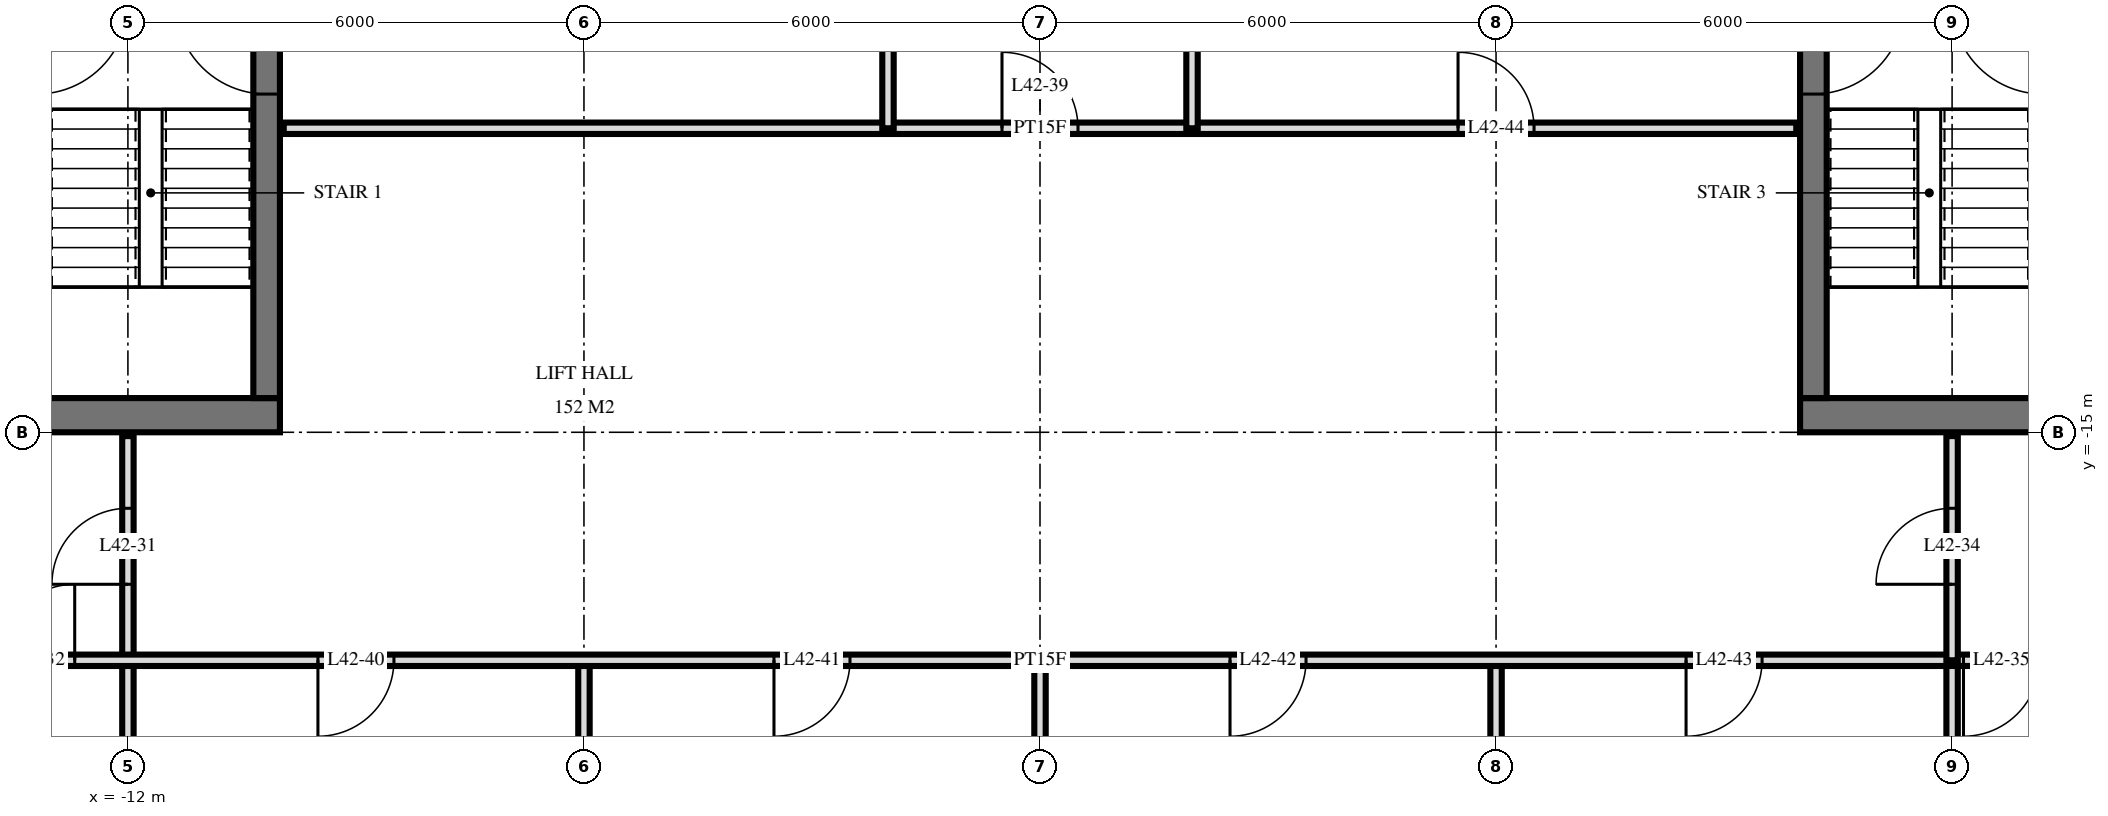
"""IFC4 building model, lengths in metres.
Left out: names, types, materials, properties, quantities, classifications, styles, units other than length and angle.
Written with IfcOpenShell. Run it as: python <this file> out.ifc"""

import sys

from ifc_helpers import new_model, si_unit, direction, frame, frame_2d, origin, place, context, subcontext, project, spatial, rectangle, extrude, element, fill, save


model = new_model("IFC4")
c1 = context("Model", 3, precision=1e-05, world=origin(), true_north=direction((0.0, 1.0)))
c2 = subcontext(c1, "Body", "Model", "MODEL_VIEW")
j1 = project(units=[si_unit("LENGTHUNIT", "METRE"), si_unit("PLANEANGLEUNIT", "RADIAN")], contexts=[c1])
p1 = place(None, origin())
s1 = spatial("IfcSite", under=j1, at=p1, CompositionType="ELEMENT")
p2 = place(p1, origin())
s2 = spatial("IfcBuilding", under=s1, at=p2, CompositionType="ELEMENT")
p3 = place(p2, frame((0.0, 0.0, 163.2)))
s3 = spatial("IfcBuildingStorey", under=s2, at=p3, CompositionType="ELEMENT", Elevation=163.2)
p4 = place(p3, frame((-24.5, -14.775, 0.0), z_axis=(0.0, 0.0, 1.0), x_axis=(1.0, 0.0, 0.0)))
e1 = element("IfcWall", 1, at=p4, inside=s3, PredefinedType="SHEAR", context=c2, shape_type="SweptSolid", body=[
    extrude(rectangle(XDim=14.5, YDim=0.45, at=frame_2d((7.25, 0.0))), origin(), (0.0, 0.0, 1.0), 3.6),
])
p5 = place(p4, frame((6.2, 0.0, 0.0)))
e2 = element("IfcOpeningElement", 2, at=p5, cuts=e1, PredefinedType="OPENING", context=c2, shape_type="SweptSolid", body=[
    extrude(rectangle(XDim=1.2, YDim=2.1, at=frame_2d((0.6, 1.05))), frame((0.0, 0.235, 0.0), z_axis=(0.0, -1.0, 0.0), x_axis=(1.0, 0.0, 0.0)), (0.0, 0.0, 1.0), 0.47),
])
p6 = place(p4, frame((9.25, 0.0, 0.0)))
e3 = element("IfcOpeningElement", 3, at=p6, cuts=e1, PredefinedType="OPENING", context=c2, shape_type="SweptSolid", body=[
    extrude(rectangle(XDim=1.1, YDim=2.1, at=frame_2d((0.55, 1.05))), frame((0.0, 0.235, 0.0), z_axis=(0.0, -1.0, 0.0), x_axis=(1.0, 0.0, 0.0)), (0.0, 0.0, 1.0), 0.47),
])
p7 = place(p4, frame((3.5, 0.0, 0.0)))
e4 = element("IfcOpeningElement", 4, at=p7, cuts=e1, PredefinedType="OPENING", context=c2, shape_type="SweptSolid", body=[
    extrude(rectangle(XDim=0.9, YDim=2.1, at=frame_2d((0.45, 1.05))), frame((0.0, 0.235, 0.0), z_axis=(0.0, -1.0, 0.0), x_axis=(1.0, 0.0, 0.0)), (0.0, 0.0, 1.0), 0.47),
])
p8 = place(p4, frame((1.05, 0.0, 0.0)))
e5 = element("IfcOpeningElement", 5, at=p8, cuts=e1, PredefinedType="OPENING", context=c2, shape_type="SweptSolid", body=[
    extrude(rectangle(XDim=1.0, YDim=2.1, at=frame_2d((0.5, 1.05))), frame((0.0, 0.235, 0.0), z_axis=(0.0, -1.0, 0.0), x_axis=(1.0, 0.0, 0.0)), (0.0, 0.0, 1.0), 0.47),
])
p9 = place(p3, frame((-10.175, -14.55, 0.0), z_axis=(0.0, 0.0, 1.0), x_axis=(0.0, 1.0, 0.0)))
e6 = element("IfcWall", 6, at=p9, inside=s3, PredefinedType="SHEAR", context=c2, shape_type="SweptSolid", body=[
    extrude(rectangle(XDim=14.1, YDim=0.35, at=frame_2d((7.05, 0.0))), origin(), (0.0, 0.0, 1.0), 3.6),
])
p10 = place(p9, frame((8.4, 0.0, 0.0)))
e7 = element("IfcOpeningElement", 7, at=p10, cuts=e6, PredefinedType="OPENING", context=c2, shape_type="SweptSolid", body=[
    extrude(rectangle(XDim=1.4, YDim=2.4, at=frame_2d((0.7, 1.2))), frame((0.0, 0.185, 0.0), z_axis=(0.0, -1.0, 0.0), x_axis=(1.0, 0.0, 0.0)), (0.0, 0.0, 1.0), 0.37),
])
p11 = place(p9, frame((10.0, 0.0, 0.0)))
e8 = element("IfcOpeningElement", 8, at=p11, cuts=e6, PredefinedType="OPENING", context=c2, shape_type="SweptSolid", body=[
    extrude(rectangle(XDim=1.4, YDim=2.4, at=frame_2d((0.7, 1.2))), frame((0.0, 0.185, 0.0), z_axis=(0.0, -1.0, 0.0), x_axis=(1.0, 0.0, 0.0)), (0.0, 0.0, 1.0), 0.37),
])
p12 = place(p9, frame((4.0, 0.0, 0.0)))
e9 = element("IfcOpeningElement", 9, at=p12, cuts=e6, PredefinedType="OPENING", context=c2, shape_type="SweptSolid", body=[
    extrude(rectangle(XDim=1.2, YDim=2.1, at=frame_2d((0.6, 1.05))), frame((0.0, 0.185, 0.0), z_axis=(0.0, -1.0, 0.0), x_axis=(1.0, 0.0, 0.0)), (0.0, 0.0, 1.0), 0.37),
])
p13 = place(p3, frame((10.0, -14.775, 0.0), z_axis=(0.0, 0.0, 1.0), x_axis=(1.0, 0.0, 0.0)))
e10 = element("IfcWall", 10, at=p13, inside=s3, PredefinedType="SHEAR", context=c2, shape_type="SweptSolid", body=[
    extrude(rectangle(XDim=14.5, YDim=0.45, at=frame_2d((7.25, 0.0))), origin(), (0.0, 0.0, 1.0), 3.6),
])
p14 = place(p13, frame((7.1, 0.0, 0.0)))
e11 = element("IfcOpeningElement", 11, at=p14, cuts=e10, PredefinedType="OPENING", context=c2, shape_type="SweptSolid", body=[
    extrude(rectangle(XDim=1.2, YDim=2.1, at=frame_2d((0.6, 1.05))), frame((0.0, 0.235, 0.0), z_axis=(0.0, -1.0, 0.0), x_axis=(1.0, 0.0, 0.0)), (0.0, 0.0, 1.0), 0.47),
])
p15 = place(p13, frame((4.15, 0.0, 0.0)))
e12 = element("IfcOpeningElement", 12, at=p15, cuts=e10, PredefinedType="OPENING", context=c2, shape_type="SweptSolid", body=[
    extrude(rectangle(XDim=1.1, YDim=2.1, at=frame_2d((0.55, 1.05))), frame((0.0, 0.235, 0.0), z_axis=(0.0, -1.0, 0.0), x_axis=(1.0, 0.0, 0.0)), (0.0, 0.0, 1.0), 0.47),
])
p16 = place(p13, frame((10.1, 0.0, 0.0)))
e13 = element("IfcOpeningElement", 13, at=p16, cuts=e10, PredefinedType="OPENING", context=c2, shape_type="SweptSolid", body=[
    extrude(rectangle(XDim=0.9, YDim=2.1, at=frame_2d((0.45, 1.05))), frame((0.0, 0.235, 0.0), z_axis=(0.0, -1.0, 0.0), x_axis=(1.0, 0.0, 0.0)), (0.0, 0.0, 1.0), 0.47),
])
p17 = place(p13, frame((12.45, 0.0, 0.0)))
e14 = element("IfcOpeningElement", 14, at=p17, cuts=e10, PredefinedType="OPENING", context=c2, shape_type="SweptSolid", body=[
    extrude(rectangle(XDim=1.0, YDim=2.1, at=frame_2d((0.5, 1.05))), frame((0.0, 0.235, 0.0), z_axis=(0.0, -1.0, 0.0), x_axis=(1.0, 0.0, 0.0)), (0.0, 0.0, 1.0), 0.47),
])
p18 = place(p3, frame((10.175, -14.55, 0.0), z_axis=(0.0, 0.0, 1.0), x_axis=(0.0, 1.0, 0.0)))
e15 = element("IfcWall", 15, at=p18, inside=s3, PredefinedType="SHEAR", context=c2, shape_type="SweptSolid", body=[
    extrude(rectangle(XDim=14.1, YDim=0.35, at=frame_2d((7.05, 0.0))), origin(), (0.0, 0.0, 1.0), 3.6),
])
p19 = place(p18, frame((8.4, 0.0, 0.0)))
e16 = element("IfcOpeningElement", 16, at=p19, cuts=e15, PredefinedType="OPENING", context=c2, shape_type="SweptSolid", body=[
    extrude(rectangle(XDim=1.4, YDim=2.4, at=frame_2d((0.7, 1.2))), frame((0.0, 0.185, 0.0), z_axis=(0.0, -1.0, 0.0), x_axis=(1.0, 0.0, 0.0)), (0.0, 0.0, 1.0), 0.37),
])
p20 = place(p18, frame((10.0, 0.0, 0.0)))
e17 = element("IfcOpeningElement", 17, at=p20, cuts=e15, PredefinedType="OPENING", context=c2, shape_type="SweptSolid", body=[
    extrude(rectangle(XDim=1.4, YDim=2.4, at=frame_2d((0.7, 1.2))), frame((0.0, 0.185, 0.0), z_axis=(0.0, -1.0, 0.0), x_axis=(1.0, 0.0, 0.0)), (0.0, 0.0, 1.0), 0.37),
])
p21 = place(p18, frame((4.0, 0.0, 0.0)))
e18 = element("IfcOpeningElement", 18, at=p21, cuts=e15, PredefinedType="OPENING", context=c2, shape_type="SweptSolid", body=[
    extrude(rectangle(XDim=1.2, YDim=2.1, at=frame_2d((0.6, 1.05))), frame((0.0, 0.185, 0.0), z_axis=(0.0, -1.0, 0.0), x_axis=(1.0, 0.0, 0.0)), (0.0, 0.0, 1.0), 0.37),
])
p22 = place(p3, frame((12.0, -18.0, 0.0), z_axis=(0.0, 0.0, 1.0), x_axis=(0.0, 1.0, 0.0)))
e19 = element("IfcWall", 19, at=p22, inside=s3, PredefinedType="PARTITIONING", context=c2, shape_type="SweptSolid", body=[
    extrude(rectangle(XDim=2.95, YDim=0.15, at=frame_2d((1.475, 0.0))), origin(), (0.0, 0.0, 1.0), 3.32),
])
p23 = place(p22, frame((1.0, 0.0, 0.0)))
e20 = element("IfcOpeningElement", 20, at=p23, cuts=e19, PredefinedType="OPENING", context=c2, shape_type="SweptSolid", body=[
    extrude(rectangle(XDim=1.0, YDim=2.1, at=frame_2d((0.5, 1.05))), frame((0.0, 0.085, 0.0), z_axis=(0.0, -1.0, 0.0), x_axis=(1.0, 0.0, 0.0)), (0.0, 0.0, 1.0), 0.17),
])
for number, where, z_axis, x_axis in (
    (21, (12.0, -33.62, 0.0), (0.0, 0.0, 1.0), (0.0, 1.0, 0.0)),
    (22, (6.0, -33.62, 0.0), (0.0, 0.0, 1.0), (0.0, 1.0, 0.0)),
):
    element("IfcWall", number, at=place(p3, frame(where, z_axis=z_axis, x_axis=x_axis)), inside=s3, PredefinedType="PARTITIONING", context=c2, shape_type="SweptSolid", body=[
        extrude(rectangle(XDim=15.62, YDim=0.15, at=frame_2d((7.81, 0.0))), origin(), (0.0, 0.0, 1.0), 3.32),
    ])
p24 = place(p3, frame((2.0, -11.0, 0.0), z_axis=(0.0, 0.0, 1.0), x_axis=(0.0, 1.0, 0.0)))
e23 = element("IfcWall", 23, at=p24, inside=s3, PredefinedType="PARTITIONING", context=c2, shape_type="SweptSolid", body=[
    extrude(rectangle(XDim=4.0, YDim=0.15, at=frame_2d((2.0, 0.0))), origin(), (0.0, 0.0, 1.0), 3.32),
])
p25 = place(p3, frame((0.0, -33.62, 0.0), z_axis=(0.0, 0.0, 1.0), x_axis=(0.0, 1.0, 0.0)))
e24 = element("IfcWall", 24, at=p25, inside=s3, PredefinedType="PARTITIONING", context=c2, shape_type="SweptSolid", body=[
    extrude(rectangle(XDim=15.62, YDim=0.15, at=frame_2d((7.81, 0.0))), origin(), (0.0, 0.0, 1.0), 3.32),
])
p26 = place(p3, frame((-2.0, -11.0, 0.0), z_axis=(0.0, 0.0, 1.0), x_axis=(0.0, 1.0, 0.0)))
e25 = element("IfcWall", 25, at=p26, inside=s3, PredefinedType="PARTITIONING", context=c2, shape_type="SweptSolid", body=[
    extrude(rectangle(XDim=4.0, YDim=0.15, at=frame_2d((2.0, 0.0))), origin(), (0.0, 0.0, 1.0), 3.32),
])
p27 = place(p3, frame((-6.0, -33.62, 0.0), z_axis=(0.0, 0.0, 1.0), x_axis=(0.0, 1.0, 0.0)))
e26 = element("IfcWall", 26, at=p27, inside=s3, PredefinedType="PARTITIONING", context=c2, shape_type="SweptSolid", body=[
    extrude(rectangle(XDim=15.62, YDim=0.15, at=frame_2d((7.81, 0.0))), origin(), (0.0, 0.0, 1.0), 3.32),
])
p28 = place(p3, frame((-12.0, -21.0, 0.0), z_axis=(0.0, 0.0, 1.0), x_axis=(0.0, 1.0, 0.0)))
e27 = element("IfcWall", 27, at=p28, inside=s3, PredefinedType="PARTITIONING", context=c2, shape_type="SweptSolid", body=[
    extrude(rectangle(XDim=5.95, YDim=0.15, at=frame_2d((2.975, 0.0))), origin(), (0.0, 0.0, 1.0), 3.32),
])
p29 = place(p28, frame((4.0, 0.0, 0.0)))
e28 = element("IfcOpeningElement", 28, at=p29, cuts=e27, PredefinedType="OPENING", context=c2, shape_type="SweptSolid", body=[
    extrude(rectangle(XDim=1.0, YDim=2.1, at=frame_2d((0.5, 1.05))), frame((0.0, 0.085, 0.0), z_axis=(0.0, -1.0, 0.0), x_axis=(1.0, 0.0, 0.0)), (0.0, 0.0, 1.0), 0.17),
])
p30 = place(p3, frame((-28.02, -18.0, 0.0), z_axis=(0.0, 0.0, 1.0), x_axis=(1.0, 0.0, 0.0)))
e29 = element("IfcWall", 29, at=p30, inside=s3, PredefinedType="PARTITIONING", context=c2, shape_type="SweptSolid", body=[
    extrude(rectangle(XDim=56.04, YDim=0.15, at=frame_2d((28.02, 0.0))), origin(), (0.0, 0.0, 1.0), 3.32),
])
p31 = place(p30, frame((14.32, 0.0, 0.0)))
e30 = element("IfcOpeningElement", 30, at=p31, cuts=e29, PredefinedType="OPENING", context=c2, shape_type="SweptSolid", body=[
    extrude(rectangle(XDim=1.0, YDim=2.1, at=frame_2d((0.5, 1.05))), frame((0.0, 0.085, 0.0), z_axis=(0.0, -1.0, 0.0), x_axis=(1.0, 0.0, 0.0)), (0.0, 0.0, 1.0), 0.17),
])
p32 = place(p30, frame((40.17, 0.0, 0.0)))
e31 = element("IfcOpeningElement", 31, at=p32, cuts=e29, PredefinedType="OPENING", context=c2, shape_type="SweptSolid", body=[
    extrude(rectangle(XDim=1.0, YDim=2.1, at=frame_2d((0.5, 1.05))), frame((0.0, 0.085, 0.0), z_axis=(0.0, -1.0, 0.0), x_axis=(1.0, 0.0, 0.0)), (0.0, 0.0, 1.0), 0.17),
])
p33 = place(p30, frame((44.87, 0.0, 0.0)))
e32 = element("IfcOpeningElement", 32, at=p33, cuts=e29, PredefinedType="OPENING", context=c2, shape_type="SweptSolid", body=[
    extrude(rectangle(XDim=1.0, YDim=2.1, at=frame_2d((0.5, 1.05))), frame((0.0, 0.085, 0.0), z_axis=(0.0, -1.0, 0.0), x_axis=(1.0, 0.0, 0.0)), (0.0, 0.0, 1.0), 0.17),
])
p34 = place(p30, frame((46.72, 0.0, 0.0)))
e33 = element("IfcOpeningElement", 33, at=p34, cuts=e29, PredefinedType="OPENING", context=c2, shape_type="SweptSolid", body=[
    extrude(rectangle(XDim=1.0, YDim=2.1, at=frame_2d((0.5, 1.05))), frame((0.0, 0.085, 0.0), z_axis=(0.0, -1.0, 0.0), x_axis=(1.0, 0.0, 0.0)), (0.0, 0.0, 1.0), 0.17),
])
p35 = place(p30, frame((18.52, 0.0, 0.0)))
e34 = element("IfcOpeningElement", 34, at=p35, cuts=e29, PredefinedType="OPENING", context=c2, shape_type="SweptSolid", body=[
    extrude(rectangle(XDim=1.0, YDim=2.1, at=frame_2d((0.5, 1.05))), frame((0.0, 0.085, 0.0), z_axis=(0.0, -1.0, 0.0), x_axis=(1.0, 0.0, 0.0)), (0.0, 0.0, 1.0), 0.17),
])
p36 = place(p30, frame((24.52, 0.0, 0.0)))
e35 = element("IfcOpeningElement", 35, at=p36, cuts=e29, PredefinedType="OPENING", context=c2, shape_type="SweptSolid", body=[
    extrude(rectangle(XDim=1.0, YDim=2.1, at=frame_2d((0.5, 1.05))), frame((0.0, 0.085, 0.0), z_axis=(0.0, -1.0, 0.0), x_axis=(1.0, 0.0, 0.0)), (0.0, 0.0, 1.0), 0.17),
])
p37 = place(p30, frame((30.52, 0.0, 0.0)))
e36 = element("IfcOpeningElement", 36, at=p37, cuts=e29, PredefinedType="OPENING", context=c2, shape_type="SweptSolid", body=[
    extrude(rectangle(XDim=1.0, YDim=2.1, at=frame_2d((0.5, 1.05))), frame((0.0, 0.085, 0.0), z_axis=(0.0, -1.0, 0.0), x_axis=(1.0, 0.0, 0.0)), (0.0, 0.0, 1.0), 0.17),
])
p38 = place(p30, frame((36.52, 0.0, 0.0)))
e37 = element("IfcOpeningElement", 37, at=p38, cuts=e29, PredefinedType="OPENING", context=c2, shape_type="SweptSolid", body=[
    extrude(rectangle(XDim=1.0, YDim=2.1, at=frame_2d((0.5, 1.05))), frame((0.0, 0.085, 0.0), z_axis=(0.0, -1.0, 0.0), x_axis=(1.0, 0.0, 0.0)), (0.0, 0.0, 1.0), 0.17),
])
p39 = place(p3, frame((-9.95, -11.0, 0.0), z_axis=(0.0, 0.0, 1.0), x_axis=(1.0, 0.0, 0.0)))
e38 = element("IfcWall", 38, at=p39, inside=s3, PredefinedType="PARTITIONING", context=c2, shape_type="SweptSolid", body=[
    extrude(rectangle(XDim=19.9, YDim=0.15, at=frame_2d((9.95, 0.0))), origin(), (0.0, 0.0, 1.0), 3.32),
])
p40 = place(p39, frame((9.45, 0.0, 0.0)))
e39 = element("IfcOpeningElement", 39, at=p40, cuts=e38, PredefinedType="OPENING", context=c2, shape_type="SweptSolid", body=[
    extrude(rectangle(XDim=1.0, YDim=2.1, at=frame_2d((0.5, 1.05))), frame((0.0, 0.085, 0.0), z_axis=(0.0, -1.0, 0.0), x_axis=(1.0, 0.0, 0.0)), (0.0, 0.0, 1.0), 0.17),
])
p41 = place(p39, frame((15.45, 0.0, 0.0)))
e40 = element("IfcOpeningElement", 40, at=p41, cuts=e38, PredefinedType="OPENING", context=c2, shape_type="SweptSolid", body=[
    extrude(rectangle(XDim=1.0, YDim=2.1, at=frame_2d((0.5, 1.05))), frame((0.0, 0.085, 0.0), z_axis=(0.0, -1.0, 0.0), x_axis=(1.0, 0.0, 0.0)), (0.0, 0.0, 1.0), 0.17),
])
p42 = place(p12, origin())
e41 = element("IfcDoor", 41, at=p42, inside=s3, OperationType="SINGLE_SWING_LEFT", PredefinedType="DOOR", context=c2, shape_type="SweptSolid", body=[
    extrude(rectangle(XDim=1.2, YDim=2.1, at=frame_2d((0.6, 1.05))), frame((0.0, 0.025, 0.0), z_axis=(0.0, -1.0, 0.0), x_axis=(1.0, 0.0, 0.0)), (0.0, 0.0, 1.0), 0.05),
])
fill(e9, e41)
p43 = place(p21, frame((0.6, 0.0, 0.0), z_axis=(0.0, 0.0, 1.0), x_axis=(-1.0, 0.0, 0.0)))
e42 = element("IfcDoor", 42, at=p43, inside=s3, OperationType="SINGLE_SWING_RIGHT", PredefinedType="DOOR", context=c2, shape_type="SweptSolid", body=[
    extrude(rectangle(XDim=1.2, YDim=2.1, at=frame_2d((0.0, 1.05))), frame((0.0, -0.025, 0.0), z_axis=(0.0, 1.0, 0.0), x_axis=(-1.0, 0.0, 0.0)), (0.0, 0.0, 1.0), 0.05),
])
fill(e18, e42)
p44 = place(p29, origin())
e43 = element("IfcDoor", 43, at=p44, inside=s3, OperationType="SINGLE_SWING_RIGHT", PredefinedType="DOOR", context=c2, shape_type="SweptSolid", body=[
    extrude(rectangle(XDim=1.0, YDim=2.1, at=frame_2d((0.5, 1.05))), frame((0.0, 0.025, 0.0), z_axis=(0.0, -1.0, 0.0), x_axis=(1.0, 0.0, 0.0)), (0.0, 0.0, 1.0), 0.05),
])
fill(e28, e43)
p45 = place(p31, origin())
e44 = element("IfcDoor", 44, at=p45, inside=s3, OperationType="SINGLE_SWING_LEFT", PredefinedType="DOOR", context=c2, shape_type="SweptSolid", body=[
    extrude(rectangle(XDim=1.0, YDim=2.1, at=frame_2d((0.5, 1.05))), frame((0.0, 0.025, 0.0), z_axis=(0.0, -1.0, 0.0), x_axis=(1.0, 0.0, 0.0)), (0.0, 0.0, 1.0), 0.05),
])
fill(e30, e44)
p46 = place(p23, origin())
e45 = element("IfcDoor", 45, at=p46, inside=s3, OperationType="SINGLE_SWING_RIGHT", PredefinedType="DOOR", context=c2, shape_type="SweptSolid", body=[
    extrude(rectangle(XDim=1.0, YDim=2.1, at=frame_2d((0.5, 1.05))), frame((0.0, 0.025, 0.0), z_axis=(0.0, -1.0, 0.0), x_axis=(1.0, 0.0, 0.0)), (0.0, 0.0, 1.0), 0.05),
])
fill(e20, e45)
p47 = place(p32, frame((0.5, 0.0, 0.0), z_axis=(0.0, 0.0, 1.0), x_axis=(-1.0, 0.0, 0.0)))
e46 = element("IfcDoor", 46, at=p47, inside=s3, OperationType="SINGLE_SWING_LEFT", PredefinedType="DOOR", context=c2, shape_type="SweptSolid", body=[
    extrude(rectangle(XDim=1.0, YDim=2.1, at=frame_2d((0.0, 1.05))), frame((0.0, -0.025, 0.0), z_axis=(0.0, 1.0, 0.0), x_axis=(-1.0, 0.0, 0.0)), (0.0, 0.0, 1.0), 0.05),
])
fill(e31, e46)
p48 = place(p40, origin())
e47 = element("IfcDoor", 47, at=p48, inside=s3, OperationType="SINGLE_SWING_RIGHT", PredefinedType="DOOR", context=c2, shape_type="SweptSolid", body=[
    extrude(rectangle(XDim=1.0, YDim=2.1, at=frame_2d((0.5, 1.05))), frame((0.0, 0.025, 0.0), z_axis=(0.0, -1.0, 0.0), x_axis=(1.0, 0.0, 0.0)), (0.0, 0.0, 1.0), 0.05),
])
fill(e39, e47)
p49 = place(p35, frame((0.5, 0.0, 0.0), z_axis=(0.0, 0.0, 1.0), x_axis=(-1.0, 0.0, 0.0)))
e48 = element("IfcDoor", 48, at=p49, inside=s3, OperationType="SINGLE_SWING_LEFT", PredefinedType="DOOR", context=c2, shape_type="SweptSolid", body=[
    extrude(rectangle(XDim=1.0, YDim=2.1, at=frame_2d((0.0, 1.05))), frame((0.0, -0.025, 0.0), z_axis=(0.0, 1.0, 0.0), x_axis=(-1.0, 0.0, 0.0)), (0.0, 0.0, 1.0), 0.05),
])
fill(e34, e48)
p50 = place(p36, frame((0.5, 0.0, 0.0), z_axis=(0.0, 0.0, 1.0), x_axis=(-1.0, 0.0, 0.0)))
e49 = element("IfcDoor", 49, at=p50, inside=s3, OperationType="SINGLE_SWING_LEFT", PredefinedType="DOOR", context=c2, shape_type="SweptSolid", body=[
    extrude(rectangle(XDim=1.0, YDim=2.1, at=frame_2d((0.0, 1.05))), frame((0.0, -0.025, 0.0), z_axis=(0.0, 1.0, 0.0), x_axis=(-1.0, 0.0, 0.0)), (0.0, 0.0, 1.0), 0.05),
])
fill(e35, e49)
p51 = place(p37, frame((0.5, 0.0, 0.0), z_axis=(0.0, 0.0, 1.0), x_axis=(-1.0, 0.0, 0.0)))
e50 = element("IfcDoor", 50, at=p51, inside=s3, OperationType="SINGLE_SWING_LEFT", PredefinedType="DOOR", context=c2, shape_type="SweptSolid", body=[
    extrude(rectangle(XDim=1.0, YDim=2.1, at=frame_2d((0.0, 1.05))), frame((0.0, -0.025, 0.0), z_axis=(0.0, 1.0, 0.0), x_axis=(-1.0, 0.0, 0.0)), (0.0, 0.0, 1.0), 0.05),
])
fill(e36, e50)
p52 = place(p38, frame((0.5, 0.0, 0.0), z_axis=(0.0, 0.0, 1.0), x_axis=(-1.0, 0.0, 0.0)))
e51 = element("IfcDoor", 51, at=p52, inside=s3, OperationType="SINGLE_SWING_LEFT", PredefinedType="DOOR", context=c2, shape_type="SweptSolid", body=[
    extrude(rectangle(XDim=1.0, YDim=2.1, at=frame_2d((0.0, 1.05))), frame((0.0, -0.025, 0.0), z_axis=(0.0, 1.0, 0.0), x_axis=(-1.0, 0.0, 0.0)), (0.0, 0.0, 1.0), 0.05),
])
fill(e37, e51)
p53 = place(p41, origin())
e52 = element("IfcDoor", 52, at=p53, inside=s3, OperationType="SINGLE_SWING_RIGHT", PredefinedType="DOOR", context=c2, shape_type="SweptSolid", body=[
    extrude(rectangle(XDim=1.0, YDim=2.1, at=frame_2d((0.5, 1.05))), frame((0.0, 0.025, 0.0), z_axis=(0.0, -1.0, 0.0), x_axis=(1.0, 0.0, 0.0)), (0.0, 0.0, 1.0), 0.05),
])
fill(e40, e52)
save(model, sys.argv[1])
